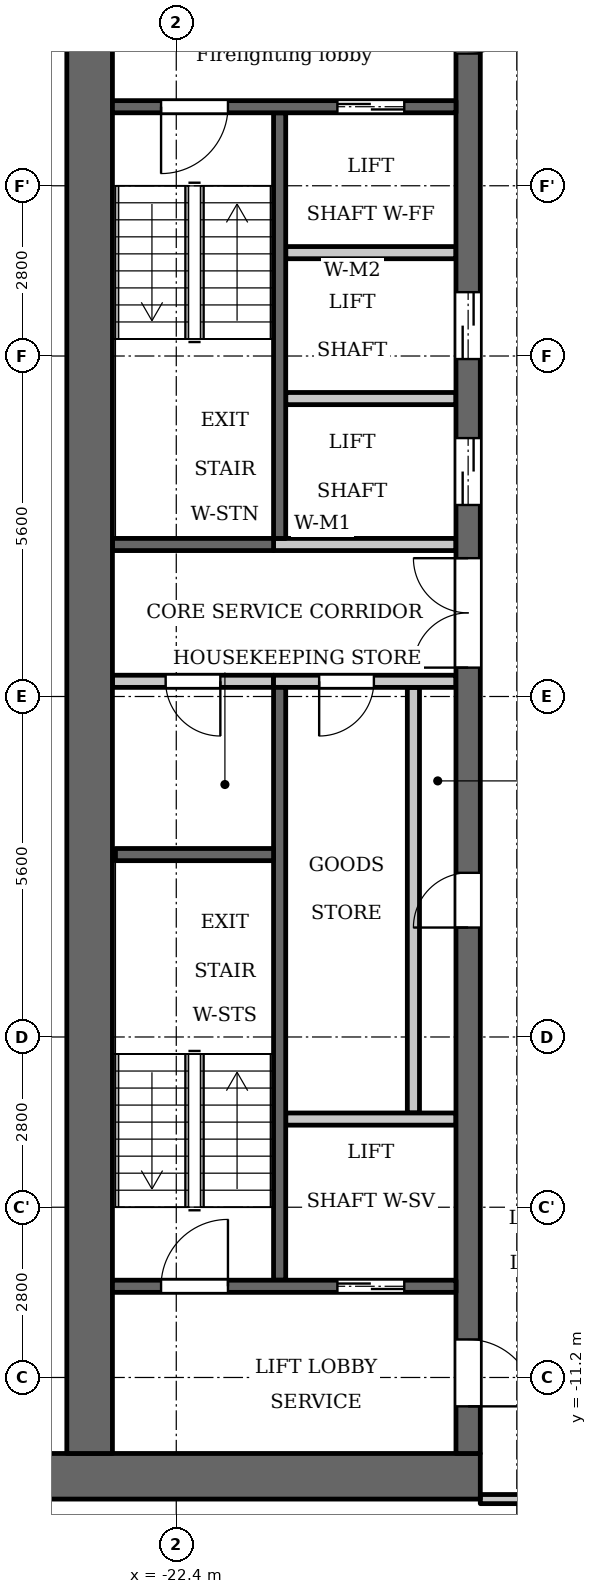
"""IFC4 building model, lengths in metres.
Left out: names, types, materials, properties, quantities, classifications, styles, units other than length and angle.
Written with IfcOpenShell. Run it as: python <this file> out.ifc"""

import sys

from ifc_helpers import new_model, si_unit, direction, frame, frame_2d, origin, place, context, subcontext, project, spatial, rectangle, extrude, element, fill, save


model = new_model("IFC4")
c1 = context("Model", 3, precision=1e-05, world=origin(), true_north=direction((0.0, 1.0)))
c2 = subcontext(c1, "Body", "Model", "MODEL_VIEW")
j1 = project(units=[si_unit("LENGTHUNIT", "METRE"), si_unit("PLANEANGLEUNIT", "RADIAN")], contexts=[c1])
p1 = place(None, origin())
s1 = spatial("IfcSite", under=j1, at=p1, CompositionType="ELEMENT")
p2 = place(p1, origin())
s2 = spatial("IfcBuilding", under=s1, at=p2, CompositionType="ELEMENT")
p3 = place(p2, frame((0.0, 0.0, 227.4)))
s3 = spatial("IfcBuildingStorey", under=s2, at=p3, CompositionType="ELEMENT", Elevation=227.4)
p4 = place(p3, frame((-20.7, 2.6, 0.0), z_axis=(0.0, 0.0, 1.0), x_axis=(0.0, 1.0, 0.0)))
e1 = element("IfcWall", 1, at=p4, inside=s3, PredefinedType="SHEAR", context=c2, shape_type="SweptSolid", body=[
    extrude(rectangle(XDim=7.0, YDim=0.2, at=frame_2d((3.5, 0.0))), origin(), (0.0, 0.0, 1.0), 3.15),
])
p5 = place(p3, frame((-20.7, -9.6, 0.0), z_axis=(0.0, 0.0, 1.0), x_axis=(0.0, 1.0, 0.0)))
e2 = element("IfcWall", 2, at=p5, inside=s3, PredefinedType="SHEAR", context=c2, shape_type="SweptSolid", body=[
    extrude(rectangle(XDim=9.75, YDim=0.2, at=frame_2d((4.875, 0.0))), origin(), (0.0, 0.0, 1.0), 3.15),
])
p6 = place(p3, frame((-20.8, 2.5, 0.0), z_axis=(0.0, 0.0, 1.0), x_axis=(-1.0, 0.0, 0.0)))
e3 = element("IfcWall", 3, at=p6, inside=s3, PredefinedType="SHEAR", context=c2, shape_type="SweptSolid", body=[
    extrude(rectangle(XDim=2.65, YDim=0.2, at=frame_2d((1.325, 0.0))), origin(), (0.0, 0.0, 1.0), 3.15),
])
p7 = place(p3, frame((-20.8, 0.25, 0.0), z_axis=(0.0, 0.0, 1.0), x_axis=(-1.0, 0.0, 0.0)))
e4 = element("IfcWall", 4, at=p7, inside=s3, PredefinedType="PARTITIONING", context=c2, shape_type="SweptSolid", body=[
    extrude(rectangle(XDim=2.65, YDim=0.2, at=frame_2d((1.325, 0.0))), origin(), (0.0, 0.0, 1.0), 3.15),
])
p8 = place(p7, frame((0.875, 0.0, 0.0)))
e5 = element("IfcOpeningElement", 5, at=p8, cuts=e4, PredefinedType="OPENING", context=c2, shape_type="SweptSolid", body=[
    extrude(rectangle(XDim=0.9, YDim=2.1, at=frame_2d((0.45, 1.05))), frame((0.0, 0.11, 0.0), z_axis=(0.0, -1.0, 0.0), x_axis=(1.0, 0.0, 0.0)), (0.0, 0.0, 1.0), 0.22),
])
p9 = place(p3, frame((-17.4, -12.825, 0.0), z_axis=(0.0, 0.0, 1.0), x_axis=(-1.0, 0.0, 0.0)))
e6 = element("IfcWall", 6, at=p9, inside=s3, PredefinedType="SHEAR", context=c2, shape_type="SweptSolid", body=[
    extrude(rectangle(XDim=7.6, YDim=0.75, at=frame_2d((3.8, 0.0))), origin(), (0.0, 0.0, 1.0), 3.15),
])
p10 = place(p3, frame((-18.5, -6.85, 0.0), z_axis=(0.0, 0.0, 1.0), x_axis=(0.0, 1.0, 0.0)))
e7 = element("IfcWall", 7, at=p10, inside=s3, PredefinedType="PARTITIONING", context=c2, shape_type="SweptSolid", body=[
    extrude(rectangle(XDim=7.0, YDim=0.2, at=frame_2d((3.5, 0.0))), origin(), (0.0, 0.0, 1.0), 3.15),
])
p11 = place(p3, frame((-17.6, -12.45, 0.0), z_axis=(0.0, 0.0, 1.0), x_axis=(0.0, 1.0, 0.0)))
e8 = element("IfcWall", 8, at=p11, inside=s3, PredefinedType="SHEAR", context=c2, shape_type="SweptSolid", body=[
    extrude(rectangle(XDim=24.9, YDim=0.4, at=frame_2d((12.45, 0.0))), origin(), (0.0, 0.0, 1.0), 3.15),
])
p12 = place(p11, frame((8.65, 0.0, 0.0)))
e9 = element("IfcOpeningElement", 9, at=p12, cuts=e8, PredefinedType="OPENING", context=c2, shape_type="SweptSolid", body=[
    extrude(rectangle(XDim=0.9, YDim=2.1, at=frame_2d((0.45, 1.05))), frame((0.0, 0.21, 0.0), z_axis=(0.0, -1.0, 0.0), x_axis=(1.0, 0.0, 0.0)), (0.0, 0.0, 1.0), 0.42),
])
p13 = place(p11, frame((15.6, 0.0, 0.0)))
e10 = element("IfcOpeningElement", 10, at=p13, cuts=e8, PredefinedType="OPENING", context=c2, shape_type="SweptSolid", body=[
    extrude(rectangle(XDim=1.1, YDim=2.1, at=frame_2d((0.55, 1.05))), frame((0.0, 0.21, 0.0), z_axis=(0.0, -1.0, 0.0), x_axis=(1.0, 0.0, 0.0)), (0.0, 0.0, 1.0), 0.42),
])
p14 = place(p11, frame((18.0, 0.0, 0.0)))
e11 = element("IfcOpeningElement", 11, at=p14, cuts=e8, PredefinedType="OPENING", context=c2, shape_type="SweptSolid", body=[
    extrude(rectangle(XDim=1.1, YDim=2.1, at=frame_2d((0.55, 1.05))), frame((0.0, 0.21, 0.0), z_axis=(0.0, -1.0, 0.0), x_axis=(1.0, 0.0, 0.0)), (0.0, 0.0, 1.0), 0.42),
])
p15 = place(p11, frame((23.025, 0.0, 0.0)))
e12 = element("IfcOpeningElement", 12, at=p15, cuts=e8, PredefinedType="OPENING", context=c2, shape_type="SweptSolid", body=[
    extrude(rectangle(XDim=1.1, YDim=2.1, at=frame_2d((0.55, 1.05))), frame((0.0, 0.21, 0.0), z_axis=(0.0, -1.0, 0.0), x_axis=(1.0, 0.0, 0.0)), (0.0, 0.0, 1.0), 0.42),
])
p16 = place(p11, frame((0.775, 0.0, 0.0)))
e13 = element("IfcOpeningElement", 13, at=p16, cuts=e8, PredefinedType="OPENING", context=c2, shape_type="SweptSolid", body=[
    extrude(rectangle(XDim=1.1, YDim=2.1, at=frame_2d((0.55, 1.05))), frame((0.0, 0.21, 0.0), z_axis=(0.0, -1.0, 0.0), x_axis=(1.0, 0.0, 0.0)), (0.0, 0.0, 1.0), 0.42),
])
p17 = place(p11, frame((12.925, 0.0, 0.0)))
e14 = element("IfcOpeningElement", 14, at=p17, cuts=e8, PredefinedType="OPENING", context=c2, shape_type="SweptSolid", body=[
    extrude(rectangle(XDim=1.8, YDim=2.1, at=frame_2d((0.9, 1.05))), frame((0.0, 0.21, 0.0), z_axis=(0.0, -1.0, 0.0), x_axis=(1.0, 0.0, 0.0)), (0.0, 0.0, 1.0), 0.42),
])
p18 = place(p3, frame((-23.825, -12.45, 0.0), z_axis=(0.0, 0.0, 1.0), x_axis=(0.0, 1.0, 0.0)))
e15 = element("IfcWall", 15, at=p18, inside=s3, PredefinedType="SHEAR", context=c2, shape_type="SweptSolid", body=[
    extrude(rectangle(XDim=24.9, YDim=0.75, at=frame_2d((12.45, 0.0))), origin(), (0.0, 0.0, 1.0), 3.15),
])
p19 = place(p3, frame((-17.8, -9.7, 0.0), z_axis=(0.0, 0.0, 1.0), x_axis=(-1.0, 0.0, 0.0)))
e16 = element("IfcWall", 16, at=p19, inside=s3, PredefinedType="SHEAR", context=c2, shape_type="SweptSolid", body=[
    extrude(rectangle(XDim=5.65, YDim=0.2, at=frame_2d((2.825, 0.0))), origin(), (0.0, 0.0, 1.0), 3.15),
])
p20 = place(p19, frame((0.85, 0.0, 0.0)))
e17 = element("IfcOpeningElement", 17, at=p20, cuts=e16, PredefinedType="OPENING", context=c2, shape_type="SweptSolid", body=[
    extrude(rectangle(XDim=1.1, YDim=2.1, at=frame_2d((0.55, 1.05))), frame((0.0, 0.11, 0.0), z_axis=(0.0, -1.0, 0.0), x_axis=(1.0, 0.0, 0.0)), (0.0, 0.0, 1.0), 0.22),
])
p21 = place(p19, frame((3.75, 0.0, 0.0)))
e18 = element("IfcOpeningElement", 18, at=p21, cuts=e16, PredefinedType="OPENING", context=c2, shape_type="SweptSolid", body=[
    extrude(rectangle(XDim=1.1, YDim=2.1, at=frame_2d((0.55, 1.05))), frame((0.0, 0.11, 0.0), z_axis=(0.0, -1.0, 0.0), x_axis=(1.0, 0.0, 0.0)), (0.0, 0.0, 1.0), 0.22),
])
p22 = place(p3, frame((-17.8, -6.95, 0.0), z_axis=(0.0, 0.0, 1.0), x_axis=(-1.0, 0.0, 0.0)))
e19 = element("IfcWall", 19, at=p22, inside=s3, PredefinedType="PARTITIONING", context=c2, shape_type="SweptSolid", body=[
    extrude(rectangle(XDim=2.8, YDim=0.2, at=frame_2d((1.4, 0.0))), origin(), (0.0, 0.0, 1.0), 3.15),
])
p23 = place(p3, frame((-17.8, 0.25, 0.0), z_axis=(0.0, 0.0, 1.0), x_axis=(-1.0, 0.0, 0.0)))
e20 = element("IfcWall", 20, at=p23, inside=s3, PredefinedType="PARTITIONING", context=c2, shape_type="SweptSolid", body=[
    extrude(rectangle(XDim=3.0, YDim=0.2, at=frame_2d((1.5, 0.0))), origin(), (0.0, 0.0, 1.0), 3.15),
])
p24 = place(p23, frame((1.35, 0.0, 0.0)))
e21 = element("IfcOpeningElement", 21, at=p24, cuts=e20, PredefinedType="OPENING", context=c2, shape_type="SweptSolid", body=[
    extrude(rectangle(XDim=0.9, YDim=2.1, at=frame_2d((0.45, 1.05))), frame((0.0, 0.11, 0.0), z_axis=(0.0, -1.0, 0.0), x_axis=(1.0, 0.0, 0.0)), (0.0, 0.0, 1.0), 0.22),
])
p25 = place(p3, frame((-17.8, 2.5, 0.0), z_axis=(0.0, 0.0, 1.0), x_axis=(-1.0, 0.0, 0.0)))
e22 = element("IfcWall", 22, at=p25, inside=s3, PredefinedType="PARTITIONING", context=c2, shape_type="SweptSolid", body=[
    extrude(rectangle(XDim=3.0, YDim=0.2, at=frame_2d((1.5, 0.0))), origin(), (0.0, 0.0, 1.0), 3.15),
])
for number, where, z_axis, x_axis in (
    (23, (-17.8, 4.9, 0.0), (0.0, 0.0, 1.0), (-1.0, 0.0, 0.0)),
    (24, (-17.8, 7.3, 0.0), (0.0, 0.0, 1.0), (-1.0, 0.0, 0.0)),
):
    element("IfcWall", number, at=place(p3, frame(where, z_axis=z_axis, x_axis=x_axis)), inside=s3, PredefinedType="PARTITIONING", context=c2, shape_type="SweptSolid", body=[
        extrude(rectangle(XDim=2.8, YDim=0.2, at=frame_2d((1.4, 0.0))), origin(), (0.0, 0.0, 1.0), 3.15),
    ])
p26 = place(p3, frame((-17.8, 9.7, 0.0), z_axis=(0.0, 0.0, 1.0), x_axis=(-1.0, 0.0, 0.0)))
e25 = element("IfcWall", 25, at=p26, inside=s3, PredefinedType="SHEAR", context=c2, shape_type="SweptSolid", body=[
    extrude(rectangle(XDim=5.65, YDim=0.2, at=frame_2d((2.825, 0.0))), origin(), (0.0, 0.0, 1.0), 3.15),
])
p27 = place(p26, frame((0.85, 0.0, 0.0)))
e26 = element("IfcOpeningElement", 26, at=p27, cuts=e25, PredefinedType="OPENING", context=c2, shape_type="SweptSolid", body=[
    extrude(rectangle(XDim=1.1, YDim=2.1, at=frame_2d((0.55, 1.05))), frame((0.0, 0.11, 0.0), z_axis=(0.0, -1.0, 0.0), x_axis=(1.0, 0.0, 0.0)), (0.0, 0.0, 1.0), 0.22),
])
p28 = place(p26, frame((3.75, 0.0, 0.0)))
e27 = element("IfcOpeningElement", 27, at=p28, cuts=e25, PredefinedType="OPENING", context=c2, shape_type="SweptSolid", body=[
    extrude(rectangle(XDim=1.1, YDim=2.1, at=frame_2d((0.55, 1.05))), frame((0.0, 0.11, 0.0), z_axis=(0.0, -1.0, 0.0), x_axis=(1.0, 0.0, 0.0)), (0.0, 0.0, 1.0), 0.22),
])
p29 = place(p3, frame((-20.8, -2.6, 0.0), z_axis=(0.0, 0.0, 1.0), x_axis=(-1.0, 0.0, 0.0)))
e28 = element("IfcWall", 28, at=p29, inside=s3, PredefinedType="SHEAR", context=c2, shape_type="SweptSolid", body=[
    extrude(rectangle(XDim=2.6, YDim=0.2, at=frame_2d((1.3, 0.0))), origin(), (0.0, 0.0, 1.0), 3.15),
])
p30 = place(p3, frame((-17.4, -13.2, 0.0), z_axis=(0.0, 0.0, 1.0), x_axis=(1.0, 0.0, 0.0)))
e29 = element("IfcWall", 29, at=p30, inside=s3, PredefinedType="PARTITIONING", context=c2, shape_type="SweptSolid", body=[
    extrude(rectangle(XDim=34.8, YDim=0.15, at=frame_2d((17.4, 0.0))), origin(), (0.0, 0.0, 1.0), 3.15),
])
p31 = place(p30, frame((0.65, 0.0, 0.0)))
e30 = element("IfcOpeningElement", 30, at=p31, cuts=e29, PredefinedType="OPENING", context=c2, shape_type="SweptSolid", body=[
    extrude(rectangle(XDim=1.0, YDim=2.1, at=frame_2d((0.5, 1.05))), frame((0.0, 0.085, 0.0), z_axis=(0.0, -1.0, 0.0), x_axis=(1.0, 0.0, 0.0)), (0.0, 0.0, 1.0), 0.17),
])
p32 = place(p30, frame((33.05, 0.0, 0.0)))
e31 = element("IfcOpeningElement", 31, at=p32, cuts=e29, PredefinedType="OPENING", context=c2, shape_type="SweptSolid", body=[
    extrude(rectangle(XDim=1.0, YDim=2.1, at=frame_2d((0.5, 1.05))), frame((0.0, 0.085, 0.0), z_axis=(0.0, -1.0, 0.0), x_axis=(1.0, 0.0, 0.0)), (0.0, 0.0, 1.0), 0.17),
])
p33 = place(p30, frame((10.15, 0.0, 0.0)))
e32 = element("IfcOpeningElement", 32, at=p33, cuts=e29, PredefinedType="OPENING", context=c2, shape_type="SweptSolid", body=[
    extrude(rectangle(XDim=1.0, YDim=2.1, at=frame_2d((0.5, 1.05))), frame((0.0, 0.085, 0.0), z_axis=(0.0, -1.0, 0.0), x_axis=(1.0, 0.0, 0.0)), (0.0, 0.0, 1.0), 0.17),
])
p34 = place(p30, frame((12.5, 0.0, 0.0)))
e33 = element("IfcOpeningElement", 33, at=p34, cuts=e29, PredefinedType="OPENING", context=c2, shape_type="SweptSolid", body=[
    extrude(rectangle(XDim=1.0, YDim=2.1, at=frame_2d((0.5, 1.05))), frame((0.0, 0.085, 0.0), z_axis=(0.0, -1.0, 0.0), x_axis=(1.0, 0.0, 0.0)), (0.0, 0.0, 1.0), 0.17),
])
p35 = place(p30, frame((18.0, 0.0, 0.0)))
e34 = element("IfcOpeningElement", 34, at=p35, cuts=e29, PredefinedType="OPENING", context=c2, shape_type="SweptSolid", body=[
    extrude(rectangle(XDim=1.0, YDim=2.1, at=frame_2d((0.5, 1.05))), frame((0.0, 0.085, 0.0), z_axis=(0.0, -1.0, 0.0), x_axis=(1.0, 0.0, 0.0)), (0.0, 0.0, 1.0), 0.17),
])
p36 = place(p30, frame((30.75, 0.0, 0.0)))
e35 = element("IfcOpeningElement", 35, at=p36, cuts=e29, PredefinedType="OPENING", context=c2, shape_type="SweptSolid", body=[
    extrude(rectangle(XDim=1.0, YDim=2.1, at=frame_2d((0.5, 1.05))), frame((0.0, 0.085, 0.0), z_axis=(0.0, -1.0, 0.0), x_axis=(1.0, 0.0, 0.0)), (0.0, 0.0, 1.0), 0.17),
])
p37 = place(p20, origin())
e36 = element("IfcDoor", 36, at=p37, inside=s3, OperationType="DOUBLE_DOOR_SLIDING", PredefinedType="DOOR", context=c2, shape_type="SweptSolid", body=[
    extrude(rectangle(XDim=1.1, YDim=2.1, at=frame_2d((0.55, 1.05))), frame((0.0, 0.025, 0.0), z_axis=(0.0, -1.0, 0.0), x_axis=(1.0, 0.0, 0.0)), (0.0, 0.0, 1.0), 0.05),
])
fill(e17, e36)
p38 = place(p12, origin())
e37 = element("IfcDoor", 37, at=p38, inside=s3, OperationType="SINGLE_SWING_RIGHT", PredefinedType="DOOR", context=c2, shape_type="SweptSolid", body=[
    extrude(rectangle(XDim=0.9, YDim=2.1, at=frame_2d((0.45, 1.05))), frame((0.0, 0.025, 0.0), z_axis=(0.0, -1.0, 0.0), x_axis=(1.0, 0.0, 0.0)), (0.0, 0.0, 1.0), 0.05),
])
fill(e9, e37)
p39 = place(p24, origin())
e38 = element("IfcDoor", 38, at=p39, inside=s3, OperationType="SINGLE_SWING_LEFT", PredefinedType="DOOR", context=c2, shape_type="SweptSolid", body=[
    extrude(rectangle(XDim=0.9, YDim=2.1, at=frame_2d((0.45, 1.05))), frame((0.0, 0.025, 0.0), z_axis=(0.0, -1.0, 0.0), x_axis=(1.0, 0.0, 0.0)), (0.0, 0.0, 1.0), 0.05),
])
fill(e21, e38)
p40 = place(p13, origin())
e39 = element("IfcDoor", 39, at=p40, inside=s3, OperationType="DOUBLE_DOOR_SLIDING", PredefinedType="DOOR", context=c2, shape_type="SweptSolid", body=[
    extrude(rectangle(XDim=1.1, YDim=2.1, at=frame_2d((0.55, 1.05))), frame((0.0, 0.025, 0.0), z_axis=(0.0, -1.0, 0.0), x_axis=(1.0, 0.0, 0.0)), (0.0, 0.0, 1.0), 0.05),
])
fill(e10, e39)
p41 = place(p14, origin())
e40 = element("IfcDoor", 40, at=p41, inside=s3, OperationType="DOUBLE_DOOR_SLIDING", PredefinedType="DOOR", context=c2, shape_type="SweptSolid", body=[
    extrude(rectangle(XDim=1.1, YDim=2.1, at=frame_2d((0.55, 1.05))), frame((0.0, 0.025, 0.0), z_axis=(0.0, -1.0, 0.0), x_axis=(1.0, 0.0, 0.0)), (0.0, 0.0, 1.0), 0.05),
])
fill(e11, e40)
p42 = place(p27, origin())
e41 = element("IfcDoor", 41, at=p42, inside=s3, OperationType="DOUBLE_DOOR_SLIDING", PredefinedType="DOOR", context=c2, shape_type="SweptSolid", body=[
    extrude(rectangle(XDim=1.1, YDim=2.1, at=frame_2d((0.55, 1.05))), frame((0.0, 0.025, 0.0), z_axis=(0.0, -1.0, 0.0), x_axis=(1.0, 0.0, 0.0)), (0.0, 0.0, 1.0), 0.05),
])
fill(e26, e41)
p43 = place(p15, origin())
e42 = element("IfcDoor", 42, at=p43, inside=s3, OperationType="SINGLE_SWING_RIGHT", PredefinedType="DOOR", context=c2, shape_type="SweptSolid", body=[
    extrude(rectangle(XDim=1.1, YDim=2.1, at=frame_2d((0.55, 1.05))), frame((0.0, 0.025, 0.0), z_axis=(0.0, -1.0, 0.0), x_axis=(1.0, 0.0, 0.0)), (0.0, 0.0, 1.0), 0.05),
])
fill(e12, e42)
p44 = place(p16, origin())
e43 = element("IfcDoor", 43, at=p44, inside=s3, OperationType="SINGLE_SWING_LEFT", PredefinedType="DOOR", context=c2, shape_type="SweptSolid", body=[
    extrude(rectangle(XDim=1.1, YDim=2.1, at=frame_2d((0.55, 1.05))), frame((0.0, 0.025, 0.0), z_axis=(0.0, -1.0, 0.0), x_axis=(1.0, 0.0, 0.0)), (0.0, 0.0, 1.0), 0.05),
])
fill(e13, e43)
p45 = place(p28, origin())
e44 = element("IfcDoor", 44, at=p45, inside=s3, OperationType="SINGLE_SWING_LEFT", PredefinedType="DOOR", context=c2, shape_type="SweptSolid", body=[
    extrude(rectangle(XDim=1.1, YDim=2.1, at=frame_2d((0.55, 1.05))), frame((0.0, 0.025, 0.0), z_axis=(0.0, -1.0, 0.0), x_axis=(1.0, 0.0, 0.0)), (0.0, 0.0, 1.0), 0.05),
])
fill(e27, e44)
p46 = place(p21, origin())
e45 = element("IfcDoor", 45, at=p46, inside=s3, OperationType="SINGLE_SWING_LEFT", PredefinedType="DOOR", context=c2, shape_type="SweptSolid", body=[
    extrude(rectangle(XDim=1.1, YDim=2.1, at=frame_2d((0.55, 1.05))), frame((0.0, 0.025, 0.0), z_axis=(0.0, -1.0, 0.0), x_axis=(1.0, 0.0, 0.0)), (0.0, 0.0, 1.0), 0.05),
])
fill(e18, e45)
p47 = place(p17, origin())
e46 = element("IfcDoor", 46, at=p47, inside=s3, OperationType="DOUBLE_DOOR_SINGLE_SWING", PredefinedType="DOOR", context=c2, shape_type="SweptSolid", body=[
    extrude(rectangle(XDim=1.8, YDim=2.1, at=frame_2d((0.9, 1.05))), frame((0.0, 0.025, 0.0), z_axis=(0.0, -1.0, 0.0), x_axis=(1.0, 0.0, 0.0)), (0.0, 0.0, 1.0), 0.05),
])
fill(e14, e46)
p48 = place(p8, origin())
e47 = element("IfcDoor", 47, at=p48, inside=s3, OperationType="SINGLE_SWING_RIGHT", PredefinedType="DOOR", context=c2, shape_type="SweptSolid", body=[
    extrude(rectangle(XDim=0.9, YDim=2.1, at=frame_2d((0.45, 1.05))), frame((0.0, 0.025, 0.0), z_axis=(0.0, -1.0, 0.0), x_axis=(1.0, 0.0, 0.0)), (0.0, 0.0, 1.0), 0.05),
])
fill(e5, e47)
save(model, sys.argv[1])
